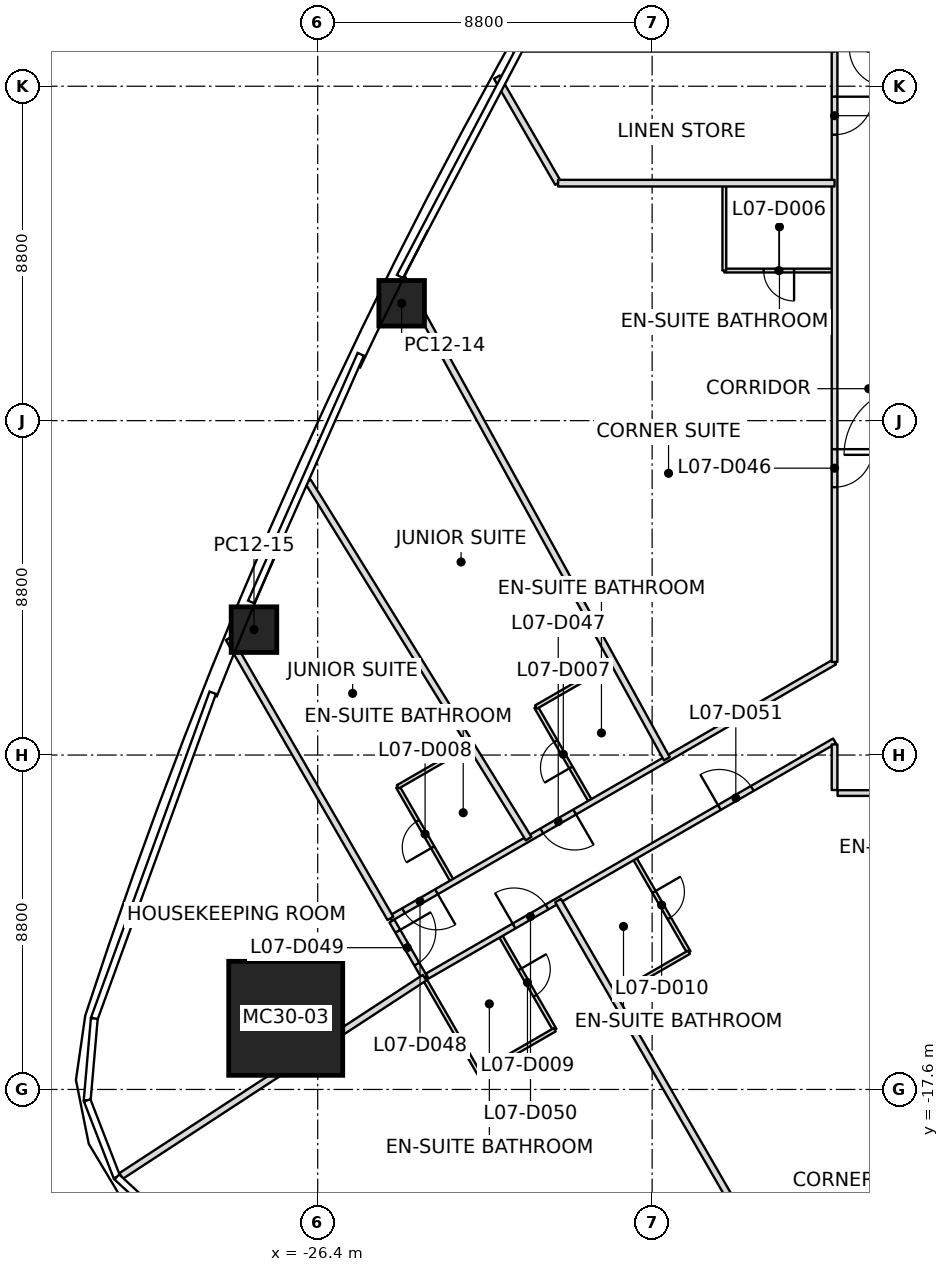
"""IFC4 building model, lengths in metres.
Left out: names, types, materials, properties, quantities, classifications, styles, units other than length and angle.
Written with IfcOpenShell. Run it as: python <this file> out.ifc"""

import sys

from ifc_helpers import new_model, si_unit, direction, frame, frame_2d, origin, origin_2d, place, context, subcontext, project, spatial, rectangle, extrude, clip, halfspace, element, fill, save


model = new_model("IFC4")
c1 = context("Model", 3, precision=1e-05, world=origin(), true_north=direction((0.0, 1.0)))
c2 = subcontext(c1, "Body", "Model", "MODEL_VIEW")
j1 = project(units=[si_unit("LENGTHUNIT", "METRE"), si_unit("PLANEANGLEUNIT", "RADIAN")], contexts=[c1])
p1 = place(None, origin())
s1 = spatial("IfcSite", under=j1, at=p1, CompositionType="ELEMENT")
p2 = place(p1, origin())
s2 = spatial("IfcBuilding", under=s1, at=p2, CompositionType="ELEMENT")
p3 = place(p2, frame((0.0, 0.0, 48.0)))
s3 = spatial("IfcBuildingStorey", under=s2, at=p3, CompositionType="ELEMENT", Elevation=48.0)
p4 = place(p3, frame((-27.242, -15.728, 0.0), z_axis=(0.030597838594, 0.017672889533, 0.99937552564), x_axis=(0.99953177652, -0.000541005533, -0.030593055416)))
e1 = element("IfcColumn", 1, at=p4, inside=s3, PredefinedType="COLUMN", context=c2, shape_type="SweptSolid", body=[
    clip(extrude(rectangle(XDim=3.0, YDim=3.0, at=origin_2d()), origin(), (0.0, 0.0, 1.0), 3.702), halfspace(frame((0.0, 0.0, 0.018)), True)),
])
p5 = place(p3, frame((-24.191, 3.088, 0.0), z_axis=(0.015306644787, 0.002309192102, 0.99988017995), x_axis=(0.441920685772, 0.897010601558, -0.008836751577)))
e2 = element("IfcColumn", 2, at=p5, inside=s3, PredefinedType="COLUMN", context=c2, shape_type="SweptSolid", body=[
    clip(extrude(rectangle(XDim=1.2, YDim=1.2, at=origin_2d()), origin(), (0.0, 0.0, 1.0), 3.7), halfspace(frame((0.0, 0.0, 0.003)), True)),
])
p6 = place(p3, frame((-28.077, -5.5, 0.0), z_axis=(0.019526598325, 0.011016695677, 0.999748640596), x_axis=(0.381957446123, 0.924011503162, -0.017642317722)))
e3 = element("IfcColumn", 3, at=p6, inside=s3, PredefinedType="COLUMN", context=c2, shape_type="SweptSolid", body=[
    clip(extrude(rectangle(XDim=1.2, YDim=1.2, at=origin_2d()), origin(), (0.0, 0.0, 1.0), 3.701), halfspace(frame((0.0, 0.0, 0.005)), True)),
])
p7 = place(p3, frame((-31.573, -19.877, 0.0), z_axis=(0.0, 0.0, 1.0), x_axis=(0.837059317436, 0.547112144898, 0.0)))
e4 = element("IfcWall", 4, at=p7, inside=s3, PredefinedType="PARTITIONING", context=c2, shape_type="SweptSolid", body=[
    extrude(rectangle(XDim=9.54, YDim=0.175, at=frame_2d((4.77, 0.0))), origin(), (0.0, 0.0, 1.0), 2.934),
])
p8 = place(p3, frame((-24.488, -13.099, 0.0), z_axis=(0.0, 0.0, 1.0), x_axis=(-0.500003147101, 0.866023586797, 0.0)))
e5 = element("IfcWall", 5, at=p8, inside=s3, PredefinedType="PARTITIONING", context=c2, shape_type="SweptSolid", body=[
    extrude(rectangle(XDim=8.508, YDim=0.175, at=frame_2d((4.254, 0.0))), origin(), (0.0, 0.0, 1.0), 2.934),
])
p9 = place(p3, frame((-20.85, -10.999, 0.0), z_axis=(0.0, 0.0, 1.0), x_axis=(-0.525650001795, 0.850700931945, 0.0)))
e6 = element("IfcWall", 6, at=p9, inside=s3, PredefinedType="PARTITIONING", context=c2, shape_type="SweptSolid", body=[
    extrude(rectangle(XDim=11.048, YDim=0.175, at=frame_2d((5.524, 0.0))), origin(), (0.0, 0.0, 1.0), 2.934),
])
p10 = place(p3, frame((-17.213, -8.899, 0.0), z_axis=(0.0, 0.0, 1.0), x_axis=(-0.482265023756, 0.876025368846, 0.0)))
e7 = element("IfcWall", 7, at=p10, inside=s3, PredefinedType="PARTITIONING", context=c2, shape_type="SweptSolid", body=[
    extrude(rectangle(XDim=14.424, YDim=0.175, at=frame_2d((7.212, 0.0))), origin(), (0.0, 0.0, 1.0), 2.947),
])
p11 = place(p3, frame((-21.686, 9.041, 0.0), z_axis=(0.0, 0.0, 1.0), x_axis=(0.499975971767, -0.866039276047, 0.0)))
e8 = element("IfcWall", 8, at=p11, inside=s3, PredefinedType="PARTITIONING", context=c2, shape_type="SweptSolid", body=[
    extrude(rectangle(XDim=3.223, YDim=0.175, at=frame_2d((1.612, 0.0))), origin(), (0.0, 0.0, 1.0), 2.934),
])
p12 = place(p3, frame((-20.075, 6.249, 0.0), z_axis=(0.0, 0.0, 1.0), x_axis=(1.0, 0.0, 0.0)))
e9 = element("IfcWall", 9, at=p12, inside=s3, PredefinedType="PARTITIONING", context=c2, shape_type="SweptSolid", body=[
    extrude(rectangle(XDim=7.275, YDim=0.175, at=frame_2d((3.637, 0.0))), origin(), (0.0, 0.0, 1.0), 3.093),
])
p13 = place(p3, frame((-20.075, -12.629, 0.0), z_axis=(0.0, 0.0, 1.0), x_axis=(0.500000727794, -0.866024983592, 0.0)))
e10 = element("IfcWall", 10, at=p13, inside=s3, PredefinedType="PARTITIONING", context=c2, shape_type="SweptSolid", body=[
    extrude(rectangle(XDim=18.277, YDim=0.175, at=frame_2d((9.139, 0.0))), origin(), (0.0, 0.0, 1.0), 2.797),
])
p14 = place(p3, frame((-12.8, -6.351, 0.0), z_axis=(0.0, 0.0, 1.0), x_axis=(-0.866024715125, -0.500001192792, 0.0)))
e11 = element("IfcWall", 11, at=p14, inside=s3, PredefinedType="PARTITIONING", context=c2, shape_type="SweptSolid", body=[
    extrude(rectangle(XDim=13.496, YDim=0.15, at=frame_2d((6.748, 0.0))), origin(), (0.0, 0.0, 1.0), 2.947),
])
p15 = place(p14, frame((7.896, 0.0, 0.0)))
e12 = element("IfcOpeningElement", 12, at=p15, cuts=e11, PredefinedType="OPENING", context=c2, shape_type="SweptSolid", body=[
    extrude(rectangle(XDim=1.0, YDim=2.1, at=frame_2d((0.5, 1.05))), frame((0.0, 0.075, 0.0), z_axis=(0.0, -1.0, 0.0), x_axis=(1.0, 0.0, 0.0)), (0.0, 0.0, 1.0), 0.15),
])
p16 = place(p14, frame((12.095, 0.0, 0.0)))
e13 = element("IfcOpeningElement", 13, at=p16, cuts=e11, PredefinedType="OPENING", context=c2, shape_type="SweptSolid", body=[
    extrude(rectangle(XDim=1.0, YDim=2.1, at=frame_2d((0.5, 1.05))), frame((0.0, 0.075, 0.0), z_axis=(0.0, -1.0, 0.0), x_axis=(1.0, 0.0, 0.0)), (0.0, 0.0, 1.0), 0.15),
])
p17 = place(p3, frame((-24.448, -13.168, 0.0), z_axis=(0.0, 0.0, 1.0), x_axis=(0.500062383118, -0.865989383878, 0.0)))
e14 = element("IfcWall", 14, at=p17, inside=s3, PredefinedType="PARTITIONING", context=c2, shape_type="SweptSolid", body=[
    extrude(rectangle(XDim=1.72, YDim=0.15, at=frame_2d((0.86, 0.0))), origin(), (0.0, 0.0, 1.0), 2.797),
])
p18 = place(p17, frame((0.31, 0.0, 0.0)))
e15 = element("IfcOpeningElement", 15, at=p18, cuts=e14, PredefinedType="OPENING", context=c2, shape_type="SweptSolid", body=[
    extrude(rectangle(XDim=1.0, YDim=2.1, at=frame_2d((0.5, 1.05))), frame((0.0, 0.075, 0.0), z_axis=(0.0, -1.0, 0.0), x_axis=(1.0, 0.0, 0.0)), (0.0, 0.0, 1.0), 0.15),
])
p19 = place(p3, frame((-23.518, -14.617, 0.0), z_axis=(0.0, 0.0, 1.0), x_axis=(0.866023964651, 0.500002492643, 0.0)))
e16 = element("IfcWall", 16, at=p19, inside=s3, PredefinedType="PARTITIONING", context=c2, shape_type="SweptSolid", body=[
    extrude(rectangle(XDim=12.376, YDim=0.15, at=frame_2d((6.188, 0.0))), origin(), (0.0, 0.0, 1.0), 2.797),
])
p20 = place(p19, frame((2.638, 0.0, 0.0)))
e17 = element("IfcOpeningElement", 17, at=p20, cuts=e16, PredefinedType="OPENING", context=c2, shape_type="SweptSolid", body=[
    extrude(rectangle(XDim=1.0, YDim=2.1, at=frame_2d((0.5, 1.05))), frame((0.0, 0.075, 0.0), z_axis=(0.0, -1.0, 0.0), x_axis=(1.0, 0.0, 0.0)), (0.0, 0.0, 1.0), 0.15),
])
p21 = place(p19, frame((8.876, 0.0, 0.0)))
e18 = element("IfcOpeningElement", 18, at=p21, cuts=e16, PredefinedType="OPENING", context=c2, shape_type="SweptSolid", body=[
    extrude(rectangle(XDim=1.0, YDim=2.1, at=frame_2d((0.5, 1.05))), frame((0.0, 0.075, 0.0), z_axis=(0.0, -1.0, 0.0), x_axis=(1.0, 0.0, 0.0)), (0.0, 0.0, 1.0), 0.15),
])
p22 = place(p3, frame((-12.8, -8.521, 0.0), z_axis=(0.0, 0.0, 1.0), x_axis=(0.0, -1.0, 0.0)))
e19 = element("IfcWall", 19, at=p22, inside=s3, PredefinedType="PARTITIONING", context=c2, shape_type="SweptSolid", body=[
    extrude(rectangle(XDim=1.199, YDim=0.15, at=frame_2d((0.6, 0.0))), origin(), (0.0, 0.0, 1.0), 2.797),
])
p23 = place(p3, frame((-12.8, 9.72, 0.0), z_axis=(0.0, 0.0, 1.0), x_axis=(0.0, -1.0, 0.0)))
e20 = element("IfcWall", 20, at=p23, inside=s3, PredefinedType="PARTITIONING", context=c2, shape_type="SweptSolid", body=[
    extrude(rectangle(XDim=16.071, YDim=0.15, at=frame_2d((8.035, 0.0))), origin(), (0.0, 0.0, 1.0), 3.017),
])
p24 = place(p23, frame((1.195, 0.0, 0.0)))
e21 = element("IfcOpeningElement", 21, at=p24, cuts=e20, PredefinedType="OPENING", context=c2, shape_type="SweptSolid", body=[
    extrude(rectangle(XDim=1.0, YDim=2.1, at=frame_2d((0.5, 1.05))), frame((0.0, 0.075, 0.0), z_axis=(0.0, -1.0, 0.0), x_axis=(1.0, 0.0, 0.0)), (0.0, 0.0, 1.0), 0.15),
])
p25 = place(p23, frame((10.471, 0.0, 0.0)))
e22 = element("IfcOpeningElement", 22, at=p25, cuts=e20, PredefinedType="OPENING", context=c2, shape_type="SweptSolid", body=[
    extrude(rectangle(XDim=1.0, YDim=2.1, at=frame_2d((0.5, 1.05))), frame((0.0, 0.075, 0.0), z_axis=(0.0, -1.0, 0.0), x_axis=(1.0, 0.0, 0.0)), (0.0, 0.0, 1.0), 0.15),
])
p26 = place(p3, frame((-12.72, -9.8, 0.0), z_axis=(0.0, 0.0, 1.0), x_axis=(1.0, 0.0, 0.0)))
e23 = element("IfcWall", 23, at=p26, inside=s3, PredefinedType="PARTITIONING", context=c2, shape_type="SweptSolid", body=[
    extrude(rectangle(XDim=25.44, YDim=0.15, at=frame_2d((12.72, 0.0))), origin(), (0.0, 0.0, 1.0), 2.947),
])
p27 = place(p26, frame((7.32, 0.0, 0.0)))
e24 = element("IfcOpeningElement", 24, at=p27, cuts=e23, PredefinedType="OPENING", context=c2, shape_type="SweptSolid", body=[
    extrude(rectangle(XDim=1.0, YDim=2.1, at=frame_2d((0.5, 1.05))), frame((0.0, 0.075, 0.0), z_axis=(0.0, -1.0, 0.0), x_axis=(1.0, 0.0, 0.0)), (0.0, 0.0, 1.0), 0.15),
])
p28 = place(p26, frame((11.52, 0.0, 0.0)))
e25 = element("IfcOpeningElement", 25, at=p28, cuts=e23, PredefinedType="OPENING", context=c2, shape_type="SweptSolid", body=[
    extrude(rectangle(XDim=1.0, YDim=2.1, at=frame_2d((0.5, 1.05))), frame((0.0, 0.075, 0.0), z_axis=(0.0, -1.0, 0.0), x_axis=(1.0, 0.0, 0.0)), (0.0, 0.0, 1.0), 0.15),
])
p29 = place(p26, frame((15.72, 0.0, 0.0)))
e26 = element("IfcOpeningElement", 26, at=p29, cuts=e23, PredefinedType="OPENING", context=c2, shape_type="SweptSolid", body=[
    extrude(rectangle(XDim=1.0, YDim=2.1, at=frame_2d((0.5, 1.05))), frame((0.0, 0.075, 0.0), z_axis=(0.0, -1.0, 0.0), x_axis=(1.0, 0.0, 0.0)), (0.0, 0.0, 1.0), 0.15),
])
p30 = place(p26, frame((19.92, 0.0, 0.0)))
e27 = element("IfcOpeningElement", 27, at=p30, cuts=e23, PredefinedType="OPENING", context=c2, shape_type="SweptSolid", body=[
    extrude(rectangle(XDim=1.0, YDim=2.1, at=frame_2d((0.5, 1.05))), frame((0.0, 0.075, 0.0), z_axis=(0.0, -1.0, 0.0), x_axis=(1.0, 0.0, 0.0)), (0.0, 0.0, 1.0), 0.15),
])
p31 = place(p3, frame((-21.598, -13.543, 0.0), z_axis=(0.0, 0.0, 1.0), x_axis=(0.499936001555, -0.866062350151, 0.0)))
e28 = element("IfcWall", 28, at=p31, inside=s3, PredefinedType="PARTITIONING", context=c2, shape_type="SweptSolid", body=[
    extrude(rectangle(XDim=2.87, YDim=0.1, at=frame_2d((1.435, 0.0))), origin(), (0.0, 0.0, 1.0), 3.15),
])
p32 = place(p31, frame((1.035, 0.0, 0.0)))
e29 = element("IfcOpeningElement", 29, at=p32, cuts=e28, PredefinedType="OPENING", context=c2, shape_type="SweptSolid", body=[
    extrude(rectangle(XDim=0.8, YDim=2.1, at=frame_2d((0.4, 1.05))), frame((0.0, 0.05, 0.0), z_axis=(0.0, -1.0, 0.0), x_axis=(1.0, 0.0, 0.0)), (0.0, 0.0, 1.0), 0.1),
])
p33 = place(p3, frame((-20.163, -16.029, 0.0), z_axis=(0.0, 0.0, 1.0), x_axis=(-0.86602648383, -0.499998129301, 0.0)))
e30 = element("IfcWall", 30, at=p33, inside=s3, PredefinedType="PARTITIONING", context=c2, shape_type="SweptSolid", body=[
    extrude(rectangle(XDim=2.3, YDim=0.1, at=frame_2d((1.15, 0.0))), origin(), (0.0, 0.0, 1.0), 3.15),
])
p34 = place(p3, frame((-22.155, -17.179, 0.0), z_axis=(0.0, 0.0, 1.0), x_axis=(-0.500036638401, 0.866004249561, 0.0)))
e31 = element("IfcWall", 31, at=p34, inside=s3, PredefinedType="PARTITIONING", context=c2, shape_type="SweptSolid", body=[
    extrude(rectangle(XDim=2.87, YDim=0.1, at=frame_2d((1.435, 0.0))), origin(), (0.0, 0.0, 1.0), 3.15),
])
p35 = place(p3, frame((-22.857, -12.123, 0.0), z_axis=(0.0, 0.0, 1.0), x_axis=(-0.499936001555, 0.866062350151, 0.0)))
e32 = element("IfcWall", 32, at=p35, inside=s3, PredefinedType="PARTITIONING", context=c2, shape_type="SweptSolid", body=[
    extrude(rectangle(XDim=2.87, YDim=0.1, at=frame_2d((1.435, 0.0))), origin(), (0.0, 0.0, 1.0), 3.15),
])
p36 = place(p35, frame((1.035, 0.0, 0.0)))
e33 = element("IfcOpeningElement", 33, at=p36, cuts=e32, PredefinedType="OPENING", context=c2, shape_type="SweptSolid", body=[
    extrude(rectangle(XDim=0.8, YDim=2.1, at=frame_2d((0.4, 1.05))), frame((0.0, 0.05, 0.0), z_axis=(0.0, -1.0, 0.0), x_axis=(1.0, 0.0, 0.0)), (0.0, 0.0, 1.0), 0.1),
])
p37 = place(p3, frame((-24.292, -9.637, 0.0), z_axis=(0.0, 0.0, 1.0), x_axis=(0.866017224141, 0.500014167291, 0.0)))
e34 = element("IfcWall", 34, at=p37, inside=s3, PredefinedType="PARTITIONING", context=c2, shape_type="SweptSolid", body=[
    extrude(rectangle(XDim=2.27, YDim=0.1, at=frame_2d((1.135, 0.0))), origin(), (0.0, 0.0, 1.0), 3.15),
])
p38 = place(p3, frame((-19.22, -10.023, 0.0), z_axis=(0.0, 0.0, 1.0), x_axis=(-0.499999802827, 0.866025517622, 0.0)))
e35 = element("IfcWall", 35, at=p38, inside=s3, PredefinedType="PARTITIONING", context=c2, shape_type="SweptSolid", body=[
    extrude(rectangle(XDim=2.87, YDim=0.1, at=frame_2d((1.435, 0.0))), origin(), (0.0, 0.0, 1.0), 3.15),
])
p39 = place(p38, frame((1.035, 0.0, 0.0)))
e36 = element("IfcOpeningElement", 36, at=p39, cuts=e35, PredefinedType="OPENING", context=c2, shape_type="SweptSolid", body=[
    extrude(rectangle(XDim=0.8, YDim=2.1, at=frame_2d((0.4, 1.05))), frame((0.0, 0.05, 0.0), z_axis=(0.0, -1.0, 0.0), x_axis=(1.0, 0.0, 0.0)), (0.0, 0.0, 1.0), 0.1),
])
p40 = place(p3, frame((-20.655, -7.537, 0.0), z_axis=(0.0, 0.0, 1.0), x_axis=(0.866017224141, 0.500014167291, 0.0)))
e37 = element("IfcWall", 37, at=p40, inside=s3, PredefinedType="PARTITIONING", context=c2, shape_type="SweptSolid", body=[
    extrude(rectangle(XDim=2.27, YDim=0.1, at=frame_2d((1.135, 0.0))), origin(), (0.0, 0.0, 1.0), 2.947),
])
p41 = place(p3, frame((-18.068, -11.505, 0.0), z_axis=(0.0, 0.0, 1.0), x_axis=(0.500036638401, -0.866004249561, 0.0)))
e38 = element("IfcWall", 38, at=p41, inside=s3, PredefinedType="PARTITIONING", context=c2, shape_type="SweptSolid", body=[
    extrude(rectangle(XDim=2.87, YDim=0.1, at=frame_2d((1.435, 0.0))), origin(), (0.0, 0.0, 1.0), 2.797),
])
p42 = place(p41, frame((1.035, 0.0, 0.0)))
e39 = element("IfcOpeningElement", 39, at=p42, cuts=e38, PredefinedType="OPENING", context=c2, shape_type="SweptSolid", body=[
    extrude(rectangle(XDim=0.8, YDim=2.1, at=frame_2d((0.4, 1.05))), frame((0.0, 0.05, 0.0), z_axis=(0.0, -1.0, 0.0), x_axis=(1.0, 0.0, 0.0)), (0.0, 0.0, 1.0), 0.1),
])
p43 = place(p3, frame((-16.633, -13.991, 0.0), z_axis=(0.0, 0.0, 1.0), x_axis=(-0.866017224141, -0.500014167291, 0.0)))
e40 = element("IfcWall", 40, at=p43, inside=s3, PredefinedType="PARTITIONING", context=c2, shape_type="SweptSolid", body=[
    extrude(rectangle(XDim=2.27, YDim=0.1, at=frame_2d((1.135, 0.0))), origin(), (0.0, 0.0, 1.0), 3.15),
])
p44 = place(p3, frame((-12.83, 3.949, 0.0), z_axis=(0.0, 0.0, 1.0), x_axis=(-1.0, 0.0, 0.0)))
e41 = element("IfcWall", 41, at=p44, inside=s3, PredefinedType="PARTITIONING", context=c2, shape_type="SweptSolid", body=[
    extrude(rectangle(XDim=2.87, YDim=0.1, at=frame_2d((1.435, 0.0))), origin(), (0.0, 0.0, 1.0), 3.093),
])
p45 = place(p44, frame((1.035, 0.0, 0.0)))
e42 = element("IfcOpeningElement", 42, at=p45, cuts=e41, PredefinedType="OPENING", context=c2, shape_type="SweptSolid", body=[
    extrude(rectangle(XDim=0.8, YDim=2.1, at=frame_2d((0.4, 1.05))), frame((0.0, 0.05, 0.0), z_axis=(0.0, -1.0, 0.0), x_axis=(1.0, 0.0, 0.0)), (0.0, 0.0, 1.0), 0.1),
])
p46 = place(p3, frame((-15.7, 3.949, 0.0), z_axis=(0.0, 0.0, 1.0), x_axis=(0.0, 1.0, 0.0)))
e43 = element("IfcWall", 43, at=p46, inside=s3, PredefinedType="PARTITIONING", context=c2, shape_type="SweptSolid", body=[
    extrude(rectangle(XDim=2.27, YDim=0.1, at=frame_2d((1.135, 0.0))), origin(), (0.0, 0.0, 1.0), 3.093),
])
p47 = place(p24, origin())
e44 = element("IfcDoor", 44, at=p47, inside=s3, OperationType="SINGLE_SWING_LEFT", PredefinedType="DOOR", context=c2, shape_type="SweptSolid", body=[
    extrude(rectangle(XDim=1.0, YDim=2.1, at=frame_2d((0.5, 1.05))), frame((0.0, 0.025, 0.0), z_axis=(0.0, -1.0, 0.0), x_axis=(1.0, 0.0, 0.0)), (0.0, 0.0, 1.0), 0.05),
])
fill(e21, e44)
p48 = place(p25, origin())
e45 = element("IfcDoor", 45, at=p48, inside=s3, OperationType="SINGLE_SWING_RIGHT", PredefinedType="DOOR", context=c2, shape_type="SweptSolid", body=[
    extrude(rectangle(XDim=1.0, YDim=2.1, at=frame_2d((0.5, 1.05))), frame((0.0, 0.025, 0.0), z_axis=(0.0, -1.0, 0.0), x_axis=(1.0, 0.0, 0.0)), (0.0, 0.0, 1.0), 0.05),
])
fill(e22, e45)
p49 = place(p45, origin())
e46 = element("IfcDoor", 46, at=p49, inside=s3, OperationType="SINGLE_SWING_RIGHT", PredefinedType="DOOR", context=c2, shape_type="SweptSolid", body=[
    extrude(rectangle(XDim=0.8, YDim=2.1, at=frame_2d((0.4, 1.05))), frame((0.0, 0.025, 0.0), z_axis=(0.0, -1.0, 0.0), x_axis=(1.0, 0.0, 0.0)), (0.0, 0.0, 1.0), 0.05),
])
fill(e42, e46)
p50 = place(p15, origin())
e47 = element("IfcDoor", 47, at=p50, inside=s3, OperationType="SINGLE_SWING_LEFT", PredefinedType="DOOR", context=c2, shape_type="SweptSolid", body=[
    extrude(rectangle(XDim=1.0, YDim=2.1, at=frame_2d((0.5, 1.05))), frame((0.0, 0.025, 0.0), z_axis=(0.0, -1.0, 0.0), x_axis=(1.0, 0.0, 0.0)), (0.0, 0.0, 1.0), 0.05),
])
fill(e12, e47)
p51 = place(p39, origin())
e48 = element("IfcDoor", 48, at=p51, inside=s3, OperationType="SINGLE_SWING_LEFT", PredefinedType="DOOR", context=c2, shape_type="SweptSolid", body=[
    extrude(rectangle(XDim=0.8, YDim=2.1, at=frame_2d((0.4, 1.05))), frame((0.0, 0.025, 0.0), z_axis=(0.0, -1.0, 0.0), x_axis=(1.0, 0.0, 0.0)), (0.0, 0.0, 1.0), 0.05),
])
fill(e36, e48)
p52 = place(p16, origin())
e49 = element("IfcDoor", 49, at=p52, inside=s3, OperationType="SINGLE_SWING_LEFT", PredefinedType="DOOR", context=c2, shape_type="SweptSolid", body=[
    extrude(rectangle(XDim=1.0, YDim=2.1, at=frame_2d((0.5, 1.05))), frame((0.0, 0.025, 0.0), z_axis=(0.0, -1.0, 0.0), x_axis=(1.0, 0.0, 0.0)), (0.0, 0.0, 1.0), 0.05),
])
fill(e13, e49)
p53 = place(p36, origin())
e50 = element("IfcDoor", 50, at=p53, inside=s3, OperationType="SINGLE_SWING_LEFT", PredefinedType="DOOR", context=c2, shape_type="SweptSolid", body=[
    extrude(rectangle(XDim=0.8, YDim=2.1, at=frame_2d((0.4, 1.05))), frame((0.0, 0.025, 0.0), z_axis=(0.0, -1.0, 0.0), x_axis=(1.0, 0.0, 0.0)), (0.0, 0.0, 1.0), 0.05),
])
fill(e33, e50)
p54 = place(p18, origin())
e51 = element("IfcDoor", 51, at=p54, inside=s3, OperationType="SINGLE_SWING_LEFT", PredefinedType="DOOR", context=c2, shape_type="SweptSolid", body=[
    extrude(rectangle(XDim=1.0, YDim=2.1, at=frame_2d((0.5, 1.05))), frame((0.0, 0.025, 0.0), z_axis=(0.0, -1.0, 0.0), x_axis=(1.0, 0.0, 0.0)), (0.0, 0.0, 1.0), 0.05),
])
fill(e15, e51)
p55 = place(p20, origin())
e52 = element("IfcDoor", 52, at=p55, inside=s3, OperationType="SINGLE_SWING_RIGHT", PredefinedType="DOOR", context=c2, shape_type="SweptSolid", body=[
    extrude(rectangle(XDim=1.0, YDim=2.1, at=frame_2d((0.5, 1.05))), frame((0.0, 0.025, 0.0), z_axis=(0.0, -1.0, 0.0), x_axis=(1.0, 0.0, 0.0)), (0.0, 0.0, 1.0), 0.05),
])
fill(e17, e52)
p56 = place(p32, origin())
e53 = element("IfcDoor", 53, at=p56, inside=s3, OperationType="SINGLE_SWING_LEFT", PredefinedType="DOOR", context=c2, shape_type="SweptSolid", body=[
    extrude(rectangle(XDim=0.8, YDim=2.1, at=frame_2d((0.4, 1.05))), frame((0.0, 0.025, 0.0), z_axis=(0.0, -1.0, 0.0), x_axis=(1.0, 0.0, 0.0)), (0.0, 0.0, 1.0), 0.05),
])
fill(e29, e53)
p57 = place(p21, origin())
e54 = element("IfcDoor", 54, at=p57, inside=s3, OperationType="SINGLE_SWING_LEFT", PredefinedType="DOOR", context=c2, shape_type="SweptSolid", body=[
    extrude(rectangle(XDim=1.0, YDim=2.1, at=frame_2d((0.5, 1.05))), frame((0.0, 0.025, 0.0), z_axis=(0.0, -1.0, 0.0), x_axis=(1.0, 0.0, 0.0)), (0.0, 0.0, 1.0), 0.05),
])
fill(e18, e54)
p58 = place(p42, origin())
e55 = element("IfcDoor", 55, at=p58, inside=s3, OperationType="SINGLE_SWING_LEFT", PredefinedType="DOOR", context=c2, shape_type="SweptSolid", body=[
    extrude(rectangle(XDim=0.8, YDim=2.1, at=frame_2d((0.4, 1.05))), frame((0.0, 0.025, 0.0), z_axis=(0.0, -1.0, 0.0), x_axis=(1.0, 0.0, 0.0)), (0.0, 0.0, 1.0), 0.05),
])
fill(e39, e55)
save(model, sys.argv[1])
